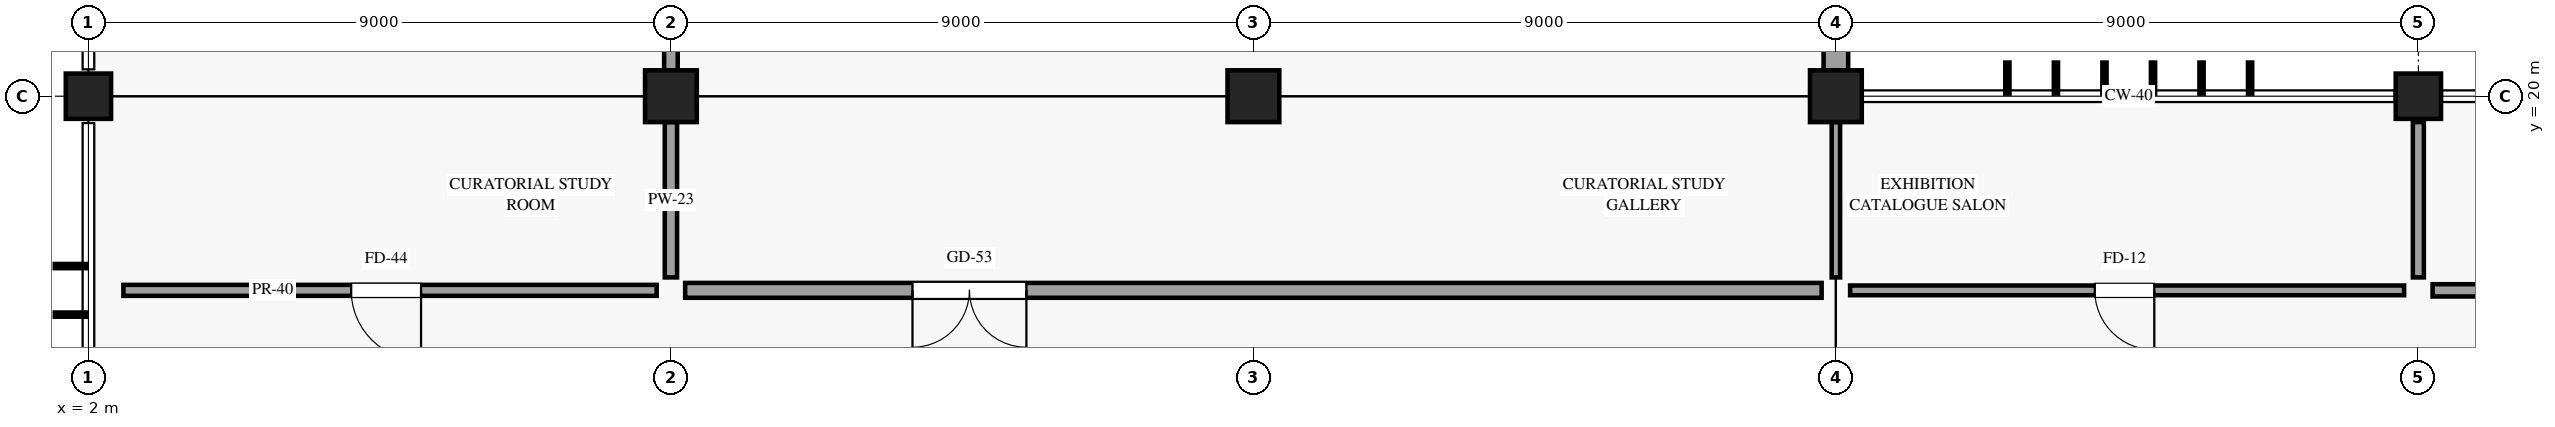
"""IFC4 building model, lengths in metres.
Left out: names, types, materials, properties, quantities, classifications, styles, units other than length and angle.
Written with IfcOpenShell. Run it as: python <this file> out.ifc"""

import sys

from ifc_helpers import new_model, si_unit, direction, frame, frame_2d, origin, origin_2d, place, context, subcontext, project, spatial, rectangle, circle, extrude, element, fill, save


model = new_model("IFC4")
c1 = context("Model", 3, precision=1e-05, world=origin(), true_north=direction((0.0, 1.0)))
c2 = subcontext(c1, "Body", "Model", "MODEL_VIEW")
j1 = project(units=[si_unit("LENGTHUNIT", "METRE"), si_unit("PLANEANGLEUNIT", "RADIAN")], contexts=[c1])
p1 = place(None, origin())
s1 = spatial("IfcSite", under=j1, at=p1, CompositionType="ELEMENT")
p2 = place(p1, origin())
s2 = spatial("IfcBuilding", under=s1, at=p2, CompositionType="ELEMENT")
p3 = place(p2, frame((0.0, 0.0, 5.4)))
s3 = spatial("IfcBuildingStorey", under=s2, at=p3, CompositionType="ELEMENT", Elevation=5.4)
p4 = place(p3, frame((2.0, 20.0, 0.0), z_axis=(0.0, 0.0, 1.0), x_axis=(1.0, 0.0, 0.0)))
e1 = element("IfcColumn", 1, at=p4, inside=s3, PredefinedType="COLUMN", context=c2, shape_type="SweptSolid", body=[
    extrude(rectangle(XDim=0.7, YDim=0.7, at=origin_2d()), origin(), (0.0, 0.0, 1.0), 4.8),
])
for number, where, z_axis, x_axis in (
    (2, (11.0, 20.0, 0.0), (0.0, 0.0, 1.0), (1.0, 0.0, 0.0)),
    (3, (20.0, 20.0, 0.0), (0.0, 0.0, 1.0), (1.0, 0.0, 0.0)),
    (4, (29.0, 20.0, 0.0), (0.0, 0.0, 1.0), (1.0, 0.0, 0.0)),
):
    element("IfcColumn", number, at=place(p3, frame(where, z_axis=z_axis, x_axis=x_axis)), inside=s3, PredefinedType="COLUMN", context=c2, shape_type="SweptSolid", body=[
        extrude(circle(Radius=0.4, at=origin_2d()), origin(), (0.0, 0.0, 1.0), 4.8),
    ])
p5 = place(p3, frame((38.0, 20.0, 0.0), z_axis=(0.0, 0.0, 1.0), x_axis=(1.0, 0.0, 0.0)))
e5 = element("IfcColumn", 5, at=p5, inside=s3, PredefinedType="COLUMN", context=c2, shape_type="SweptSolid", body=[
    extrude(rectangle(XDim=0.7, YDim=0.7, at=origin_2d()), origin(), (0.0, 0.0, 1.0), 4.8),
])
p6 = place(p3, frame((29.0, 20.4, 0.0), z_axis=(0.0, 0.0, 1.0), x_axis=(0.0, 1.0, 0.0)))
e6 = element("IfcWall", 6, at=p6, inside=s3, PredefinedType="STANDARD", context=c2, shape_type="SweptSolid", body=[
    extrude(rectangle(XDim=8.45, YDim=0.38, at=frame_2d((4.225, 0.0))), origin(), (0.0, 0.0, 1.0), 3.575),
])
p7 = place(p3, frame((2.54, 17.0, 0.0), z_axis=(0.0, 0.0, 1.0), x_axis=(1.0, 0.0, 0.0)))
e7 = element("IfcWall", 7, at=p7, inside=s3, PredefinedType="PARTITIONING", context=c2, shape_type="SweptSolid", body=[
    extrude(rectangle(XDim=8.24, YDim=0.17, at=frame_2d((4.12, 0.0))), origin(), (0.0, 0.0, 1.0), 3.575),
])
p8 = place(p7, frame((4.599, 0.0, 0.0), z_axis=(0.0, 0.0, 1.0), x_axis=(-1.0, 0.0, 0.0)))
e8 = element("IfcOpeningElement", 8, at=p8, cuts=e7, PredefinedType="OPENING", context=c2, shape_type="SweptSolid", body=[
    extrude(rectangle(XDim=1.08, YDim=2.24, at=frame_2d((0.54, 1.12))), frame((0.0, 0.095, 0.0), z_axis=(0.0, -1.0, 0.0), x_axis=(1.0, 0.0, 0.0)), (0.0, 0.0, 1.0), 0.19),
])
p9 = place(p3, frame((11.0, 17.2, 0.0), z_axis=(0.0, 0.0, 1.0), x_axis=(0.0, 1.0, 0.0)))
e9 = element("IfcWall", 9, at=p9, inside=s3, PredefinedType="PARTITIONING", context=c2, shape_type="SweptSolid", body=[
    extrude(rectangle(XDim=2.4, YDim=0.19, at=frame_2d((1.2, 0.0))), origin(), (0.0, 0.0, 1.0), 3.575),
])
p10 = place(p3, frame((11.0, 20.4, 0.0), z_axis=(0.0, 0.0, 1.0), x_axis=(0.0, 1.0, 0.0)))
e10 = element("IfcWall", 10, at=p10, inside=s3, PredefinedType="PARTITIONING", context=c2, shape_type="SweptSolid", body=[
    extrude(rectangle(XDim=8.4, YDim=0.21, at=frame_2d((4.2, 0.0))), origin(), (0.0, 0.0, 1.0), 3.575),
])
p11 = place(p3, frame((11.22, 17.0, 0.0), z_axis=(0.0, 0.0, 1.0), x_axis=(1.0, 0.0, 0.0)))
e11 = element("IfcWall", 11, at=p11, inside=s3, PredefinedType="PARTITIONING", context=c2, shape_type="SweptSolid", body=[
    extrude(rectangle(XDim=17.56, YDim=0.23, at=frame_2d((8.78, 0.0))), origin(), (0.0, 0.0, 1.0), 3.575),
])
p12 = place(p11, frame((5.272, 0.0, 0.0), z_axis=(0.0, 0.0, 1.0), x_axis=(-1.0, 0.0, 0.0)))
e12 = element("IfcOpeningElement", 12, at=p12, cuts=e11, PredefinedType="OPENING", context=c2, shape_type="SweptSolid", body=[
    extrude(rectangle(XDim=1.76, YDim=2.45, at=frame_2d((0.88, 1.225))), frame((0.0, 0.125, 0.0), z_axis=(0.0, -1.0, 0.0), x_axis=(1.0, 0.0, 0.0)), (0.0, 0.0, 1.0), 0.25),
])
p13 = place(p3, frame((29.0, 17.2, 0.0), z_axis=(0.0, 0.0, 1.0), x_axis=(0.0, 1.0, 0.0)))
e13 = element("IfcWall", 13, at=p13, inside=s3, PredefinedType="PARTITIONING", context=c2, shape_type="SweptSolid", body=[
    extrude(rectangle(XDim=2.4, YDim=0.13, at=frame_2d((1.2, 0.0))), origin(), (0.0, 0.0, 1.0), 3.575),
])
p14 = place(p3, frame((29.22, 17.0, 0.0), z_axis=(0.0, 0.0, 1.0), x_axis=(1.0, 0.0, 0.0)))
e14 = element("IfcWall", 14, at=p14, inside=s3, PredefinedType="PARTITIONING", context=c2, shape_type="SweptSolid", body=[
    extrude(rectangle(XDim=8.56, YDim=0.15, at=frame_2d((4.28, 0.0))), origin(), (0.0, 0.0, 1.0), 3.575),
])
p15 = place(p14, frame((4.7, 0.0, 0.0), z_axis=(0.0, 0.0, 1.0), x_axis=(-1.0, 0.0, 0.0)))
e15 = element("IfcOpeningElement", 15, at=p15, cuts=e14, PredefinedType="OPENING", context=c2, shape_type="SweptSolid", body=[
    extrude(rectangle(XDim=0.92, YDim=2.12, at=frame_2d((0.46, 1.06))), frame((0.0, 0.085, 0.0), z_axis=(0.0, -1.0, 0.0), x_axis=(1.0, 0.0, 0.0)), (0.0, 0.0, 1.0), 0.17),
])
p16 = place(p3, frame((38.0, 17.2, 0.0), z_axis=(0.0, 0.0, 1.0), x_axis=(0.0, 1.0, 0.0)))
e16 = element("IfcWall", 16, at=p16, inside=s3, PredefinedType="PARTITIONING", context=c2, shape_type="SweptSolid", body=[
    extrude(rectangle(XDim=2.4, YDim=0.17, at=frame_2d((1.2, 0.0))), origin(), (0.0, 0.0, 1.0), 3.575),
])
p17 = place(p3, frame((38.22, 17.0, 0.0), z_axis=(0.0, 0.0, 1.0), x_axis=(1.0, 0.0, 0.0)))
e17 = element("IfcWall", 17, at=p17, inside=s3, PredefinedType="PARTITIONING", context=c2, shape_type="SweptSolid", body=[
    extrude(rectangle(XDim=17.56, YDim=0.19, at=frame_2d((8.78, 0.0))), origin(), (0.0, 0.0, 1.0), 3.175),
])
p18 = place(p17, frame((13.806, 0.0, 0.0), z_axis=(0.0, 0.0, 1.0), x_axis=(-1.0, 0.0, 0.0)))
e18 = element("IfcOpeningElement", 18, at=p18, cuts=e17, PredefinedType="OPENING", context=c2, shape_type="SweptSolid", body=[
    extrude(rectangle(XDim=0.98, YDim=2.18, at=frame_2d((0.49, 1.09))), frame((0.0, 0.105, 0.0), z_axis=(0.0, -1.0, 0.0), x_axis=(1.0, 0.0, 0.0)), (0.0, 0.0, 1.0), 0.21),
])
p19 = place(p8, origin())
e19 = element("IfcDoor", 19, at=p19, inside=s3, OperationType="SINGLE_SWING_LEFT", PredefinedType="DOOR", context=c2, shape_type="SweptSolid", body=[
    extrude(rectangle(XDim=1.08, YDim=2.24, at=frame_2d((0.54, 1.12))), frame((0.0, 0.025, 0.0), z_axis=(0.0, -1.0, 0.0), x_axis=(1.0, 0.0, 0.0)), (0.0, 0.0, 1.0), 0.05),
])
fill(e8, e19)
p20 = place(p12, origin())
e20 = element("IfcDoor", 20, at=p20, inside=s3, OperationType="DOUBLE_DOOR_SINGLE_SWING", PredefinedType="DOOR", context=c2, shape_type="SweptSolid", body=[
    extrude(rectangle(XDim=1.76, YDim=2.45, at=frame_2d((0.88, 1.225))), frame((0.0, 0.025, 0.0), z_axis=(0.0, -1.0, 0.0), x_axis=(1.0, 0.0, 0.0)), (0.0, 0.0, 1.0), 0.05),
])
fill(e12, e20)
p21 = place(p15, origin())
e21 = element("IfcDoor", 21, at=p21, inside=s3, OperationType="SINGLE_SWING_LEFT", PredefinedType="DOOR", context=c2, shape_type="SweptSolid", body=[
    extrude(rectangle(XDim=0.92, YDim=2.12, at=frame_2d((0.46, 1.06))), frame((0.0, 0.025, 0.0), z_axis=(0.0, -1.0, 0.0), x_axis=(1.0, 0.0, 0.0)), (0.0, 0.0, 1.0), 0.05),
])
fill(e15, e21)
save(model, sys.argv[1])
